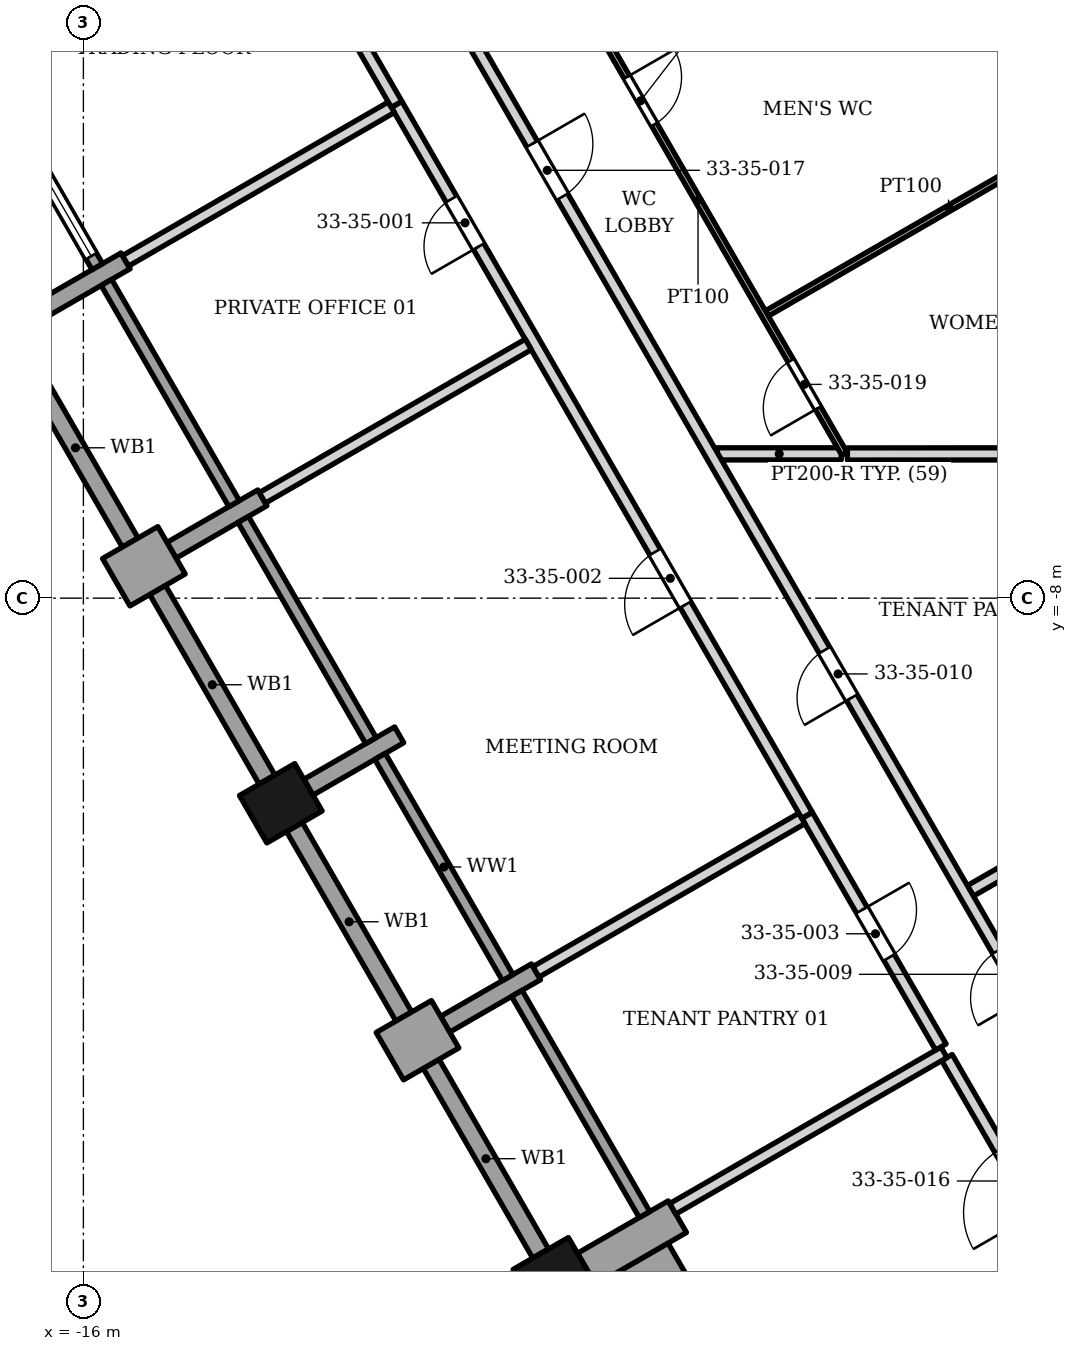
"""IFC4 building model, lengths in metres.
Left out: names, types, materials, properties, quantities, classifications, styles, units other than length and angle.
Written with IfcOpenShell. Run it as: python <this file> out.ifc"""

import sys

from ifc_helpers import new_model, si_unit, direction, frame, frame_2d, origin, origin_2d, place, context, subcontext, project, spatial, polyline, rectangle, outline, extrude, element, fill, save


model = new_model("IFC4")
c1 = context("Model", 3, precision=1e-05, world=origin(), true_north=direction((0.0, 1.0)))
c2 = subcontext(c1, "Body", "Model", "MODEL_VIEW")
j1 = project(units=[si_unit("LENGTHUNIT", "METRE"), si_unit("PLANEANGLEUNIT", "RADIAN")], contexts=[c1])
p1 = place(None, origin())
s1 = spatial("IfcSite", under=j1, at=p1, CompositionType="ELEMENT")
p2 = place(p1, origin())
s2 = spatial("IfcBuilding", under=s1, at=p2, CompositionType="ELEMENT")
p3 = place(p2, frame((0.0, 0.0, 144.6)))
s3 = spatial("IfcBuildingStorey", under=s2, at=p3, CompositionType="ELEMENT", Elevation=144.6)
for number, where, z_axis, x_axis in (
    (1, (-12.753, -11.373, 0.0), (0.0, 0.0, 1.0), (0.5, -0.866, 0.0)),
    (2, (-8.253, -19.167, 0.0), (0.0, 0.0, 1.0), (0.5, -0.866, 0.0)),
):
    element("IfcColumn", number, at=place(p3, frame(where, z_axis=z_axis, x_axis=x_axis)), inside=s3, PredefinedType="COLUMN", context=c2, shape_type="SweptSolid", body=[
        extrude(rectangle(XDim=0.9, YDim=1.05, at=origin_2d()), origin(), (0.0, 0.0, 1.0), 3.9),
    ])
p4 = place(p3, frame((-16.799, -3.315, 0.0), z_axis=(0.0, 0.0, 1.0), x_axis=(0.866010975815, 0.500024989144, 0.0)))
e3 = element("IfcWall", 3, at=p4, inside=s3, PredefinedType="SOLIDWALL", context=c2, shape_type="SweptSolid", body=[
    extrude(rectangle(XDim=1.723, YDim=0.3, at=frame_2d((0.862, 0.0))), origin(), (0.0, 0.0, 1.0), 3.0),
])
p5 = place(p3, frame((-15.46, -7.738, 0.0), z_axis=(0.0, 0.0, 1.0), x_axis=(0.865988129768, 0.500064554934, 0.0)))
e4 = element("IfcWall", 4, at=p5, inside=s3, PredefinedType="SOLIDWALL", context=c2, shape_type="SweptSolid", body=[
    extrude(rectangle(XDim=1.05, YDim=0.9, at=frame_2d((0.525, 0.0))), origin(), (0.0, 0.0, 1.0), 3.0),
])
p6 = place(p3, frame((-14.55, -7.213, 0.0), z_axis=(0.0, 0.0, 1.0), x_axis=(0.866074815912, 0.499914405916, 0.0)))
e5 = element("IfcWall", 5, at=p6, inside=s3, PredefinedType="SOLIDWALL", context=c2, shape_type="SweptSolid", body=[
    extrude(rectangle(XDim=1.725, YDim=0.3, at=frame_2d((0.862, 0.0))), origin(), (0.0, 0.0, 1.0), 2.973),
])
p7 = place(p3, frame((-10.806, -10.248, 0.0), z_axis=(0.0, 0.0, 1.0), x_axis=(-0.866020469142, -0.500008546953, 0.0)))
e6 = element("IfcWall", 6, at=p7, inside=s3, PredefinedType="SOLIDWALL", context=c2, shape_type="SweptSolid", body=[
    extrude(rectangle(XDim=1.724, YDim=0.3, at=frame_2d((0.862, 0.0))), origin(), (0.0, 0.0, 1.0), 3.0),
])
p8 = place(p3, frame((-10.05, -15.007, 0.0), z_axis=(0.0, 0.0, 1.0), x_axis=(-0.866088799389, -0.499890179513, 0.0)))
e7 = element("IfcWall", 7, at=p8, inside=s3, PredefinedType="SOLIDWALL", context=c2, shape_type="SweptSolid", body=[
    extrude(rectangle(XDim=1.05, YDim=0.9, at=frame_2d((0.525, 0.0))), origin(), (0.0, 0.0, 1.0), 3.0),
])
p9 = place(p3, frame((-10.05, -15.007, 0.0), z_axis=(0.0, 0.0, 1.0), x_axis=(0.866013532718, 0.500020560727, 0.0)))
e8 = element("IfcWall", 8, at=p9, inside=s3, PredefinedType="SOLIDWALL", context=c2, shape_type="SweptSolid", body=[
    extrude(rectangle(XDim=1.725, YDim=0.3, at=frame_2d((0.863, 0.0))), origin(), (0.0, 0.0, 1.0), 3.0),
])
p10 = place(p3, frame((-7.724, -19.033, 0.0), z_axis=(0.0, 0.0, 1.0), x_axis=(0.865985050045, 0.500069888215, 0.0)))
e9 = element("IfcWall", 9, at=p10, inside=s3, PredefinedType="SOLIDWALL", context=c2, shape_type="SweptSolid", body=[
    extrude(rectangle(XDim=1.723, YDim=0.6, at=frame_2d((0.862, 0.0))), origin(), (0.0, 0.0, 1.0), 3.0),
])
p11 = place(p3, frame((-17.871, 1.089, 0.0), z_axis=(0.0, 0.0, 1.0), x_axis=(0.499958946799, -0.866049104564, 0.0)))
e10 = element("IfcWall", 10, at=p11, inside=s3, PredefinedType="ELEMENTEDWALL", context=c2, shape_type="SweptSolid", body=[
    extrude(rectangle(XDim=4.2, YDim=0.2, at=frame_2d((2.1, 0.0))), origin(), (0.0, 0.0, 1.0), 3.0),
])
p12 = place(p11, frame((0.2, 0.0, 0.45)))
e11 = element("IfcOpeningElement", 11, at=p12, cuts=e10, PredefinedType="OPENING", context=c2, shape_type="SweptSolid", body=[
    extrude(rectangle(XDim=3.8, YDim=2.25, at=frame_2d((1.9, 1.125))), frame((0.0, 0.11, 0.0), z_axis=(0.0, -1.0, 0.0), x_axis=(1.0, 0.0, 0.0)), (0.0, 0.0, 1.0), 0.22),
])
p13 = place(p3, frame((-15.23, -7.086, 0.0), z_axis=(0.0, 0.0, 1.0), x_axis=(-0.499998428639, 0.866026311008, 0.0)))
e12 = element("IfcWall", 12, at=p13, inside=s3, PredefinedType="SOLIDWALL", context=c2, shape_type="SweptSolid", body=[
    extrude(rectangle(XDim=3.599, YDim=0.3, at=frame_2d((1.8, 0.0))), origin(), (0.0, 0.0, 1.0), 3.0),
])
p14 = place(p3, frame((-15.621, -2.808, 0.0), z_axis=(0.0, 0.0, 1.0), x_axis=(0.49998411664, -0.866034573852, 0.0)))
e13 = element("IfcWall", 13, at=p14, inside=s3, PredefinedType="ELEMENTEDWALL", context=c2, shape_type="SweptSolid", body=[
    extrude(rectangle(XDim=4.2, YDim=0.2, at=frame_2d((2.1, 0.0))), origin(), (0.0, 0.0, 1.0), 2.973),
])
p15 = place(p3, frame((-14.78, -7.865, 0.0), z_axis=(0.0, 0.0, 1.0), x_axis=(0.500012057535, -0.866018442252, 0.0)))
e14 = element("IfcWall", 14, at=p15, inside=s3, PredefinedType="SOLIDWALL", context=c2, shape_type="SweptSolid", body=[
    extrude(rectangle(XDim=3.6, YDim=0.3, at=frame_2d((1.8, 0.0))), origin(), (0.0, 0.0, 1.0), 2.973),
])
p16 = place(p3, frame((-13.371, -6.705, 0.0), z_axis=(0.0, 0.0, 1.0), x_axis=(0.499958946799, -0.866049104564, 0.0)))
e15 = element("IfcWall", 15, at=p16, inside=s3, PredefinedType="ELEMENTEDWALL", context=c2, shape_type="SweptSolid", body=[
    extrude(rectangle(XDim=4.2, YDim=0.2, at=frame_2d((2.1, 0.0))), origin(), (0.0, 0.0, 1.0), 2.973),
])
p17 = place(p3, frame((-10.73, -14.88, 0.0), z_axis=(0.0, 0.0, 1.0), x_axis=(-0.500006299954, 0.866021766474, 0.0)))
e16 = element("IfcWall", 16, at=p17, inside=s3, PredefinedType="SOLIDWALL", context=c2, shape_type="SweptSolid", body=[
    extrude(rectangle(XDim=3.599, YDim=0.3, at=frame_2d((1.799, 0.0))), origin(), (0.0, 0.0, 1.0), 2.95),
])
p18 = place(p3, frame((-11.121, -10.603, 0.0), z_axis=(0.0, 0.0, 1.0), x_axis=(0.49998411664, -0.866034573852, 0.0)))
e17 = element("IfcWall", 17, at=p18, inside=s3, PredefinedType="ELEMENTEDWALL", context=c2, shape_type="SweptSolid", body=[
    extrude(rectangle(XDim=4.2, YDim=0.2, at=frame_2d((2.1, 0.0))), origin(), (0.0, 0.0, 1.0), 2.95),
])
p19 = place(p3, frame((-10.28, -15.659, 0.0), z_axis=(0.0, 0.0, 1.0), x_axis=(0.500012057535, -0.866018442252, 0.0)))
e18 = element("IfcWall", 18, at=p19, inside=s3, PredefinedType="SOLIDWALL", context=c2, shape_type="SweptSolid", body=[
    extrude(rectangle(XDim=3.6, YDim=0.3, at=frame_2d((1.8, 0.0))), origin(), (0.0, 0.0, 1.0), 3.0),
])
p20 = place(p3, frame((-8.871, -14.5, 0.0), z_axis=(0.0, 0.0, 1.0), x_axis=(0.499958946799, -0.866049104564, 0.0)))
e19 = element("IfcWall", 19, at=p20, inside=s3, PredefinedType="ELEMENTEDWALL", context=c2, shape_type="SweptSolid", body=[
    extrude(rectangle(XDim=4.2, YDim=0.2, at=frame_2d((2.1, 0.0))), origin(), (0.0, 0.0, 1.0), 3.0),
])
p21 = place(p3, origin())
e20 = element("IfcWall", 20, at=p21, inside=s3, PredefinedType="SOLIDWALL", context=c2, shape_type="SweptSolid", body=[
    extrude(outline(polyline([(-5.559, -20.036), (-6.385, -18.606), (-7.574, -19.293), (-7.573, -19.294), (-8.483, -19.819), (-8.483, -19.818), (-8.485, -19.819), (-7.659, -21.248), (-5.559, -20.036)])), origin(), (0.0, 0.0, 1.0), 3.0),
])
p22 = place(p3, frame((-1.798, -15.555, 0.0), z_axis=(0.0, 0.0, 1.0), x_axis=(0.500381369408, -0.865805108064, 0.0)))
e21 = element("IfcWall", 21, at=p22, inside=s3, PredefinedType="PARTITIONING", context=c2, shape_type="SweptSolid", body=[
    extrude(rectangle(XDim=3.645, YDim=0.2, at=frame_2d((1.823, 0.0))), origin(), (0.0, 0.0, 1.0), 3.128),
])
p23 = place(p22, frame((1.745, 0.0, 0.0)))
e22 = element("IfcOpeningElement", 22, at=p23, cuts=e21, PredefinedType="OPENING", context=c2, shape_type="SweptSolid", body=[
    extrude(rectangle(XDim=1.2, YDim=2.4, at=frame_2d((0.6, 1.2))), frame((0.0, 0.11, 0.0), z_axis=(0.0, -1.0, 0.0), x_axis=(1.0, 0.0, 0.0)), (0.0, 0.0, 1.0), 0.22),
])
p24 = place(p3, frame((-6.306, -18.042, 0.0), z_axis=(0.0, 0.0, 1.0), x_axis=(0.86617295725, 0.499744342768, 0.0)))
e23 = element("IfcWall", 23, at=p24, inside=s3, PredefinedType="PARTITIONING", context=c2, shape_type="SweptSolid", body=[
    extrude(rectangle(XDim=5.15, YDim=0.2, at=frame_2d((2.575, 0.0))), origin(), (0.0, 0.0, 1.0), 3.052),
])
p25 = place(p3, frame((-4.097, -11.573, 0.0), z_axis=(0.0, 0.0, 1.0), x_axis=(0.500013981145, -0.866017331616, 0.0)))
e24 = element("IfcWall", 24, at=p25, inside=s3, PredefinedType="PARTITIONING", context=c2, shape_type="SweptSolid", body=[
    extrude(rectangle(XDim=4.398, YDim=0.2, at=frame_2d((2.199, 0.0))), origin(), (0.0, 0.0, 1.0), 2.95),
])
p26 = place(p25, frame((1.798, 0.0, 0.0)))
e25 = element("IfcOpeningElement", 25, at=p26, cuts=e24, PredefinedType="OPENING", context=c2, shape_type="SweptSolid", body=[
    extrude(rectangle(XDim=0.9, YDim=2.1, at=frame_2d((0.45, 1.05))), frame((0.0, 0.11, 0.0), z_axis=(0.0, -1.0, 0.0), x_axis=(1.0, 0.0, 0.0)), (0.0, 0.0, 1.0), 0.22),
])
p27 = place(p3, frame((-1.413, -12.814, 0.0), z_axis=(0.0, 0.0, 1.0), x_axis=(0.866906303058, 0.498471124258, 0.0)))
e26 = element("IfcWall", 26, at=p27, inside=s3, PredefinedType="PARTITIONING", context=c2, shape_type="SweptSolid", body=[
    extrude(rectangle(XDim=0.822, YDim=0.2, at=frame_2d((0.411, 0.0))), origin(), (0.0, 0.0, 1.0), 3.73),
])
p28 = place(p3, frame((-8.556, -14.145, 0.0), z_axis=(0.0, 0.0, 1.0), x_axis=(0.866191221831, 0.499712684673, 0.0)))
e27 = element("IfcWall", 27, at=p28, inside=s3, PredefinedType="PARTITIONING", context=c2, shape_type="SweptSolid", body=[
    extrude(rectangle(XDim=5.048, YDim=0.2, at=frame_2d((2.524, 0.0))), origin(), (0.0, 0.0, 1.0), 2.884),
])
p29 = place(p3, frame((-10.848, 0.121, 0.0), z_axis=(0.0, 0.0, 1.0), x_axis=(0.499997969693, -0.866026575979, 0.0)))
e28 = element("IfcWall", 28, at=p29, inside=s3, PredefinedType="PARTITIONING", context=c2, shape_type="SweptSolid", body=[
    extrude(rectangle(XDim=13.5, YDim=0.2, at=frame_2d((6.75, 0.0))), origin(), (0.0, 0.0, 1.0), 2.884),
])
p30 = place(p29, frame((1.8, 0.0, 0.0)))
e29 = element("IfcOpeningElement", 29, at=p30, cuts=e28, PredefinedType="OPENING", context=c2, shape_type="SweptSolid", body=[
    extrude(rectangle(XDim=0.9, YDim=2.1, at=frame_2d((0.45, 1.05))), frame((0.0, 0.11, 0.0), z_axis=(0.0, -1.0, 0.0), x_axis=(1.0, 0.0, 0.0)), (0.0, 0.0, 1.0), 0.22),
])
p31 = place(p29, frame((8.5, 0.0, 0.0)))
e30 = element("IfcOpeningElement", 30, at=p31, cuts=e28, PredefinedType="OPENING", context=c2, shape_type="SweptSolid", body=[
    extrude(rectangle(XDim=1.0, YDim=2.1, at=frame_2d((0.5, 1.05))), frame((0.0, 0.11, 0.0), z_axis=(0.0, -1.0, 0.0), x_axis=(1.0, 0.0, 0.0)), (0.0, 0.0, 1.0), 0.22),
])
p32 = place(p3, frame((-5.577, -5.627, 0.0), z_axis=(0.0, 0.0, 1.0), x_axis=(1.0, 0.0, 0.0)))
e31 = element("IfcWall", 31, at=p32, inside=s3, PredefinedType="PARTITIONING", context=c2, shape_type="SweptSolid", body=[
    extrude(rectangle(XDim=2.042, YDim=0.2, at=frame_2d((1.021, 0.0))), origin(), (0.0, 0.0, 1.0), 3.73),
])
p33 = place(p3, frame((-3.435, -5.629, 0.0), z_axis=(0.0, 0.0, 1.0), x_axis=(0.999999932729, 0.000366799388, 0.0)))
e32 = element("IfcWall", 32, at=p33, inside=s3, PredefinedType="PARTITIONING", context=c2, shape_type="SweptSolid", body=[
    extrude(rectangle(XDim=4.659, YDim=0.2, at=frame_2d((2.33, 0.0))), origin(), (0.0, 0.0, 1.0), 3.73),
])
p34 = place(p3, frame((-13.056, -6.351, 0.0), z_axis=(0.0, 0.0, 1.0), x_axis=(0.866221803303, 0.49965967166, 0.0)))
e33 = element("IfcWall", 33, at=p34, inside=s3, PredefinedType="PARTITIONING", context=c2, shape_type="SweptSolid", body=[
    extrude(rectangle(XDim=5.05, YDim=0.2, at=frame_2d((2.525, 0.0))), origin(), (0.0, 0.0, 1.0), 3.052),
])
p35 = place(p3, frame((-15.307, -2.453, 0.0), z_axis=(0.0, 0.0, 1.0), x_axis=(0.865894858421, 0.500226043064, 0.0)))
e34 = element("IfcWall", 34, at=p35, inside=s3, PredefinedType="PARTITIONING", context=c2, shape_type="SweptSolid", body=[
    extrude(rectangle(XDim=5.05, YDim=0.2, at=frame_2d((2.525, 0.0))), origin(), (0.0, 0.0, 1.0), 2.973),
])
p36 = place(p3, frame((-12.913, 3.699, 0.0), z_axis=(0.0, 0.0, 1.0), x_axis=(0.499679817836, -0.866210182143, 0.0)))
e35 = element("IfcWall", 35, at=p36, inside=s3, PredefinedType="PARTITIONING", context=c2, shape_type="SweptSolid", body=[
    extrude(rectangle(XDim=4.131, YDim=0.2, at=frame_2d((2.065, 0.0))), origin(), (0.0, 0.0, 1.0), 3.73),
])
p37 = place(p36, frame((1.166, 0.0, 0.0)))
e36 = element("IfcOpeningElement", 36, at=p37, cuts=e35, PredefinedType="OPENING", context=c2, shape_type="SweptSolid", body=[
    extrude(rectangle(XDim=1.8, YDim=2.4, at=frame_2d((0.9, 1.2))), frame((0.0, 0.11, 0.0), z_axis=(0.0, -1.0, 0.0), x_axis=(1.0, 0.0, 0.0)), (0.0, 0.0, 1.0), 0.22),
])
p38 = place(p3, frame((-4.759, -3.318, 0.0), z_axis=(0.0, 0.0, 1.0), x_axis=(0.866002450397, 0.500039754326, 0.0)))
e37 = element("IfcWall", 37, at=p38, inside=s3, PredefinedType="PARTITIONING", context=c2, shape_type="SweptSolid", body=[
    extrude(rectangle(XDim=6.927, YDim=0.1, at=frame_2d((3.463, 0.0))), origin(), (0.0, 0.0, 1.0), 2.884),
])
p39 = place(p3, frame((-8.3, 2.712, 0.0), z_axis=(0.0, 0.0, 1.0), x_axis=(0.500225649327, -0.865895085882, 0.0)))
e38 = element("IfcWall", 38, at=p39, inside=s3, PredefinedType="PARTITIONING", context=c2, shape_type="SweptSolid", body=[
    extrude(rectangle(XDim=9.631, YDim=0.1, at=frame_2d((4.815, 0.0))), origin(), (0.0, 0.0, 1.0), 2.884),
])
p40 = place(p39, frame((2.475, 0.0, 0.0)))
e39 = element("IfcOpeningElement", 39, at=p40, cuts=e38, PredefinedType="OPENING", context=c2, shape_type="SweptSolid", body=[
    extrude(rectangle(XDim=0.9, YDim=2.1, at=frame_2d((0.45, 1.05))), frame((0.0, 0.06, 0.0), z_axis=(0.0, -1.0, 0.0), x_axis=(1.0, 0.0, 0.0)), (0.0, 0.0, 1.0), 0.12),
])
p41 = place(p39, frame((7.861, 0.0, 0.0)))
e40 = element("IfcOpeningElement", 40, at=p41, cuts=e38, PredefinedType="OPENING", context=c2, shape_type="SweptSolid", body=[
    extrude(rectangle(XDim=0.9, YDim=2.1, at=frame_2d((0.45, 1.05))), frame((0.0, 0.06, 0.0), z_axis=(0.0, -1.0, 0.0), x_axis=(1.0, 0.0, 0.0)), (0.0, 0.0, 1.0), 0.12),
])
p42 = place(p3, frame((-11.064, 3.7, 0.0), z_axis=(0.0, 0.0, 1.0), x_axis=(0.500140059959, -0.865944525027, 0.0)))
e41 = element("IfcWall", 41, at=p42, inside=s3, PredefinedType="PARTITIONING", context=c2, shape_type="SweptSolid", body=[
    extrude(rectangle(XDim=22.181, YDim=0.2, at=frame_2d((11.091, 0.0))), origin(), (0.0, 0.0, 1.0), 2.884),
])
p43 = place(p42, frame((20.205, 0.0, 0.0)))
e42 = element("IfcOpeningElement", 42, at=p43, cuts=e41, PredefinedType="OPENING", context=c2, shape_type="SweptSolid", body=[
    extrude(rectangle(XDim=0.9, YDim=2.1, at=frame_2d((0.45, 1.05))), frame((0.0, 0.11, 0.0), z_axis=(0.0, -1.0, 0.0), x_axis=(1.0, 0.0, 0.0)), (0.0, 0.0, 1.0), 0.22),
])
p44 = place(p42, frame((14.5, 0.0, 0.0)))
e43 = element("IfcOpeningElement", 43, at=p44, cuts=e41, PredefinedType="OPENING", context=c2, shape_type="SweptSolid", body=[
    extrude(rectangle(XDim=0.9, YDim=2.1, at=frame_2d((0.45, 1.05))), frame((0.0, 0.11, 0.0), z_axis=(0.0, -1.0, 0.0), x_axis=(1.0, 0.0, 0.0)), (0.0, 0.0, 1.0), 0.22),
])
p45 = place(p42, frame((4.886, 0.0, 0.0)))
e44 = element("IfcOpeningElement", 44, at=p45, cuts=e41, PredefinedType="OPENING", context=c2, shape_type="SweptSolid", body=[
    extrude(rectangle(XDim=1.0, YDim=2.1, at=frame_2d((0.5, 1.05))), frame((0.0, 0.11, 0.0), z_axis=(0.0, -1.0, 0.0), x_axis=(1.0, 0.0, 0.0)), (0.0, 0.0, 1.0), 0.22),
])
p46 = place(p12, origin())
e45 = element("IfcWindow", 45, at=p46, inside=s3, PartitioningType="SINGLE_PANEL", PredefinedType="WINDOW", context=c2, shape_type="SweptSolid", body=[
    extrude(rectangle(XDim=3.8, YDim=2.25, at=frame_2d((1.9, 1.125))), frame((0.0, 0.03, 0.0), z_axis=(0.0, -1.0, 0.0), x_axis=(1.0, 0.0, 0.0)), (0.0, 0.0, 1.0), 0.06),
])
fill(e11, e45)
p47 = place(p30, origin())
e46 = element("IfcDoor", 46, at=p47, inside=s3, OperationType="SINGLE_SWING_RIGHT", PredefinedType="DOOR", context=c2, shape_type="SweptSolid", body=[
    extrude(rectangle(XDim=0.9, YDim=2.1, at=frame_2d((0.45, 1.05))), frame((0.0, 0.025, 0.0), z_axis=(0.0, -1.0, 0.0), x_axis=(1.0, 0.0, 0.0)), (0.0, 0.0, 1.0), 0.05),
])
fill(e29, e46)
p48 = place(p31, origin())
e47 = element("IfcDoor", 47, at=p48, inside=s3, OperationType="SINGLE_SWING_RIGHT", PredefinedType="DOOR", context=c2, shape_type="SweptSolid", body=[
    extrude(rectangle(XDim=1.0, YDim=2.1, at=frame_2d((0.5, 1.05))), frame((0.0, 0.025, 0.0), z_axis=(0.0, -1.0, 0.0), x_axis=(1.0, 0.0, 0.0)), (0.0, 0.0, 1.0), 0.05),
])
fill(e30, e47)
p49 = place(p26, origin())
e48 = element("IfcDoor", 48, at=p49, inside=s3, OperationType="SINGLE_SWING_LEFT", PredefinedType="DOOR", context=c2, shape_type="SweptSolid", body=[
    extrude(rectangle(XDim=0.9, YDim=2.1, at=frame_2d((0.45, 1.05))), frame((0.0, 0.025, 0.0), z_axis=(0.0, -1.0, 0.0), x_axis=(1.0, 0.0, 0.0)), (0.0, 0.0, 1.0), 0.05),
])
fill(e25, e48)
p50 = place(p44, origin())
e49 = element("IfcDoor", 49, at=p50, inside=s3, OperationType="SINGLE_SWING_RIGHT", PredefinedType="DOOR", context=c2, shape_type="SweptSolid", body=[
    extrude(rectangle(XDim=0.9, YDim=2.1, at=frame_2d((0.45, 1.05))), frame((0.0, 0.025, 0.0), z_axis=(0.0, -1.0, 0.0), x_axis=(1.0, 0.0, 0.0)), (0.0, 0.0, 1.0), 0.05),
])
fill(e43, e49)
p51 = place(p45, origin())
e50 = element("IfcDoor", 50, at=p51, inside=s3, OperationType="SINGLE_SWING_LEFT", PredefinedType="DOOR", context=c2, shape_type="SweptSolid", body=[
    extrude(rectangle(XDim=1.0, YDim=2.1, at=frame_2d((0.5, 1.05))), frame((0.0, 0.025, 0.0), z_axis=(0.0, -1.0, 0.0), x_axis=(1.0, 0.0, 0.0)), (0.0, 0.0, 1.0), 0.05),
])
fill(e44, e50)
p52 = place(p40, origin())
e51 = element("IfcDoor", 51, at=p52, inside=s3, OperationType="SINGLE_SWING_LEFT", PredefinedType="DOOR", context=c2, shape_type="SweptSolid", body=[
    extrude(rectangle(XDim=0.9, YDim=2.1, at=frame_2d((0.45, 1.05))), frame((0.0, 0.025, 0.0), z_axis=(0.0, -1.0, 0.0), x_axis=(1.0, 0.0, 0.0)), (0.0, 0.0, 1.0), 0.05),
])
fill(e39, e51)
p53 = place(p41, origin())
e52 = element("IfcDoor", 52, at=p53, inside=s3, OperationType="SINGLE_SWING_RIGHT", PredefinedType="DOOR", context=c2, shape_type="SweptSolid", body=[
    extrude(rectangle(XDim=0.9, YDim=2.1, at=frame_2d((0.45, 1.05))), frame((0.0, 0.025, 0.0), z_axis=(0.0, -1.0, 0.0), x_axis=(1.0, 0.0, 0.0)), (0.0, 0.0, 1.0), 0.05),
])
fill(e40, e52)
save(model, sys.argv[1])
